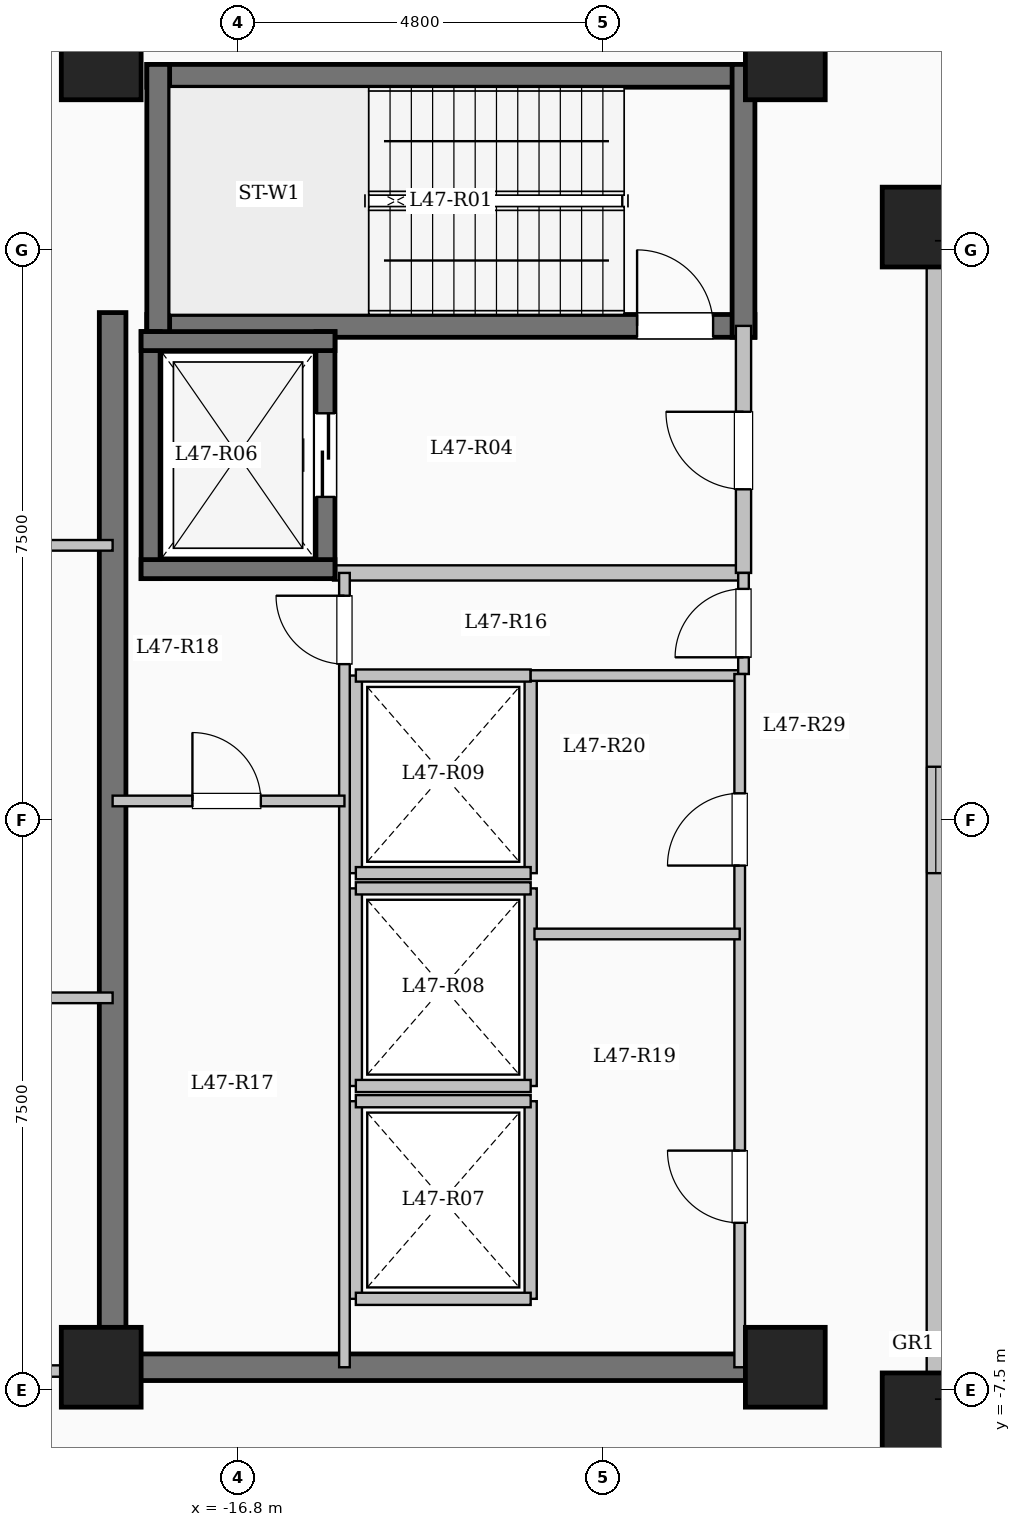
"""IFC4 building model, lengths in metres.
Left out: names, types, materials, properties, quantities, classifications, styles, units other than length and angle.
Written with IfcOpenShell. Run it as: python <this file> out.ifc"""

import sys

from ifc_helpers import new_model, si_unit, direction, frame, frame_2d, origin, origin_2d, place, context, subcontext, project, spatial, rectangle, extrude, element, fill, save


model = new_model("IFC4")
c1 = context("Model", 3, precision=1e-05, world=origin(), true_north=direction((0.0, 1.0)))
c2 = subcontext(c1, "Body", "Model", "MODEL_VIEW")
j1 = project(units=[si_unit("LENGTHUNIT", "METRE"), si_unit("PLANEANGLEUNIT", "RADIAN")], contexts=[c1])
p1 = place(None, origin())
s1 = spatial("IfcSite", under=j1, at=p1, CompositionType="ELEMENT")
p2 = place(p1, origin())
s2 = spatial("IfcBuilding", under=s1, at=p2, CompositionType="ELEMENT")
p3 = place(p2, frame((0.0, 0.0, 172.8)))
s3 = spatial("IfcBuildingStorey", under=s2, at=p3, CompositionType="ELEMENT", Elevation=172.8)
for number, where, z_axis, x_axis in (
    (1, (-7.8, -7.8, 0.0), (0.0, 0.0, 1.0), (1.0, 0.0, 0.0)),
    (2, (-7.8, 7.8, 0.0), (0.0, 0.0, 1.0), (1.0, 0.0, 0.0)),
    (3, (-9.6, -7.2, 0.0), (0.0, 0.0, 1.0), (1.0, 0.0, 0.0)),
    (4, (-9.6, 10.0, 0.0), (0.0, 0.0, 1.0), (1.0, 0.0, 0.0)),
    (5, (-18.6, -7.2, 0.0), (0.0, 0.0, 1.0), (1.0, 0.0, 0.0)),
    (6, (-18.6, 10.0, 0.0), (0.0, 0.0, 1.0), (1.0, 0.0, 0.0)),
):
    element("IfcColumn", number, at=place(p3, frame(where, z_axis=z_axis, x_axis=x_axis)), inside=s3, PredefinedType="COLUMN", context=c2, shape_type="SweptSolid", body=[
        extrude(rectangle(XDim=1.05, YDim=1.05, at=origin_2d()), origin(), (0.0, 0.0, 1.0), 4.5),
    ])
p4 = place(p3, frame((-7.62, 7.62, 0.0), z_axis=(0.0, 0.0, 1.0), x_axis=(0.0, -1.0, 0.0)))
e7 = element("IfcWall", 7, at=p4, inside=s3, PredefinedType="SOLIDWALL", context=c2, shape_type="SweptSolid", body=[
    extrude(rectangle(XDim=15.24, YDim=0.24, at=frame_2d((7.62, 0.0))), origin(), (0.0, 0.0, 1.0), 4.2),
])
p5 = place(p4, frame((6.92, 0.0, 0.95)))
e8 = element("IfcOpeningElement", 8, at=p5, cuts=e7, PredefinedType="OPENING", context=c2, shape_type="SweptSolid", body=[
    extrude(rectangle(XDim=1.4, YDim=1.5, at=frame_2d((0.7, 0.75))), frame((0.0, 0.13, 0.0), z_axis=(0.0, -1.0, 0.0), x_axis=(1.0, 0.0, 0.0)), (0.0, 0.0, 1.0), 0.26),
])
p6 = place(p3, frame((-18.0, 9.79, 0.0), z_axis=(0.0, 0.0, 1.0), x_axis=(1.0, 0.0, 0.0)))
e9 = element("IfcWall", 9, at=p6, inside=s3, PredefinedType="SHEAR", context=c2, shape_type="SweptSolid", body=[
    extrude(rectangle(XDim=8.0, YDim=0.3, at=frame_2d((4.0, 0.0))), origin(), (0.0, 0.0, 1.0), 4.5),
])
p7 = place(p3, frame((-18.0, 6.5, 0.0), z_axis=(0.0, 0.0, 1.0), x_axis=(1.0, 0.0, 0.0)))
e10 = element("IfcWall", 10, at=p7, inside=s3, PredefinedType="SHEAR", context=c2, shape_type="SweptSolid", body=[
    extrude(rectangle(XDim=8.0, YDim=0.3, at=frame_2d((4.0, 0.0))), origin(), (0.0, 0.0, 1.0), 4.5),
])
p8 = place(p7, frame((6.45, 0.0, 0.0)))
e11 = element("IfcOpeningElement", 11, at=p8, cuts=e10, PredefinedType="OPENING", context=c2, shape_type="SweptSolid", body=[
    extrude(rectangle(XDim=1.0, YDim=2.15, at=frame_2d((0.5, 1.075))), frame((0.0, 0.16, 0.0), z_axis=(0.0, -1.0, 0.0), x_axis=(1.0, 0.0, 0.0)), (0.0, 0.0, 1.0), 0.32),
])
for number, where, z_axis, x_axis in (
    (12, (-17.85, 6.35, 0.0), (0.0, 0.0, 1.0), (0.0, 1.0, 0.0)),
    (13, (-10.15, 6.35, 0.0), (0.0, 0.0, 1.0), (0.0, 1.0, 0.0)),
):
    element("IfcWall", number, at=place(p3, frame(where, z_axis=z_axis, x_axis=x_axis)), inside=s3, PredefinedType="SHEAR", context=c2, shape_type="SweptSolid", body=[
        extrude(rectangle(XDim=3.59, YDim=0.3, at=frame_2d((1.795, 0.0))), origin(), (0.0, 0.0, 1.0), 4.5),
    ])
p9 = place(p3, frame((-15.55, 3.25, 0.0), z_axis=(0.0, 0.0, 1.0), x_axis=(1.0, 0.0, 0.0)))
e14 = element("IfcWall", 14, at=p9, inside=s3, PredefinedType="SOLIDWALL", context=c2, shape_type="SweptSolid", body=[
    extrude(rectangle(XDim=5.4, YDim=0.2, at=frame_2d((2.7, 0.0))), origin(), (0.0, 0.0, 1.0), 4.2),
])
p10 = place(p3, frame((-10.15, 3.25, 0.0), z_axis=(0.0, 0.0, 1.0), x_axis=(0.0, 1.0, 0.0)))
e15 = element("IfcWall", 15, at=p10, inside=s3, PredefinedType="SOLIDWALL", context=c2, shape_type="SweptSolid", body=[
    extrude(rectangle(XDim=3.25, YDim=0.2, at=frame_2d((1.625, 0.0))), origin(), (0.0, 0.0, 1.0), 4.2),
])
p11 = place(p10, frame((1.1, 0.0, 0.0)))
e16 = element("IfcOpeningElement", 16, at=p11, cuts=e15, PredefinedType="OPENING", context=c2, shape_type="SweptSolid", body=[
    extrude(rectangle(XDim=1.02, YDim=2.15, at=frame_2d((0.51, 1.075))), frame((0.0, 0.11, 0.0), z_axis=(0.0, -1.0, 0.0), x_axis=(1.0, 0.0, 0.0)), (0.0, 0.0, 1.0), 0.22),
])
p12 = place(p3, frame((-17.95, 3.175, 0.0), z_axis=(0.0, 0.0, 1.0), x_axis=(0.0, 1.0, 0.0)))
e17 = element("IfcWall", 17, at=p12, inside=s3, PredefinedType="SHEAR", context=c2, shape_type="SweptSolid", body=[
    extrude(rectangle(XDim=3.25, YDim=0.25, at=frame_2d((1.625, 0.0))), origin(), (0.0, 0.0, 1.0), 4.5),
])
p13 = place(p3, frame((-15.65, 3.175, 0.0), z_axis=(0.0, 0.0, 1.0), x_axis=(0.0, 1.0, 0.0)))
e18 = element("IfcWall", 18, at=p13, inside=s3, PredefinedType="SHEAR", context=c2, shape_type="SweptSolid", body=[
    extrude(rectangle(XDim=3.25, YDim=0.25, at=frame_2d((1.625, 0.0))), origin(), (0.0, 0.0, 1.0), 4.5),
])
p14 = place(p13, frame((1.075, 0.0, 0.0)))
e19 = element("IfcOpeningElement", 19, at=p14, cuts=e18, PredefinedType="OPENING", context=c2, shape_type="SweptSolid", body=[
    extrude(rectangle(XDim=1.1, YDim=2.15, at=frame_2d((0.55, 1.075))), frame((0.0, 0.135, 0.0), z_axis=(0.0, -1.0, 0.0), x_axis=(1.0, 0.0, 0.0)), (0.0, 0.0, 1.0), 0.27),
])
for number, where, z_axis, x_axis in (
    (20, (-18.075, 3.3, 0.0), (0.0, 0.0, 1.0), (1.0, 0.0, 0.0)),
    (21, (-18.075, 6.3, 0.0), (0.0, 0.0, 1.0), (1.0, 0.0, 0.0)),
):
    element("IfcWall", number, at=place(p3, frame(where, z_axis=z_axis, x_axis=x_axis)), inside=s3, PredefinedType="SHEAR", context=c2, shape_type="SweptSolid", body=[
        extrude(rectangle(XDim=2.55, YDim=0.25, at=frame_2d((1.275, 0.0))), origin(), (0.0, 0.0, 1.0), 4.5),
    ])
for number, where, z_axis, x_axis in (
    (22, (-15.25, -6.3, 0.0), (0.0, 0.0, 1.0), (0.0, 1.0, 0.0)),
    (23, (-12.95, -6.3, 0.0), (0.0, 0.0, 1.0), (0.0, 1.0, 0.0)),
):
    element("IfcWall", number, at=place(p3, frame(where, z_axis=z_axis, x_axis=x_axis)), inside=s3, PredefinedType="SOLIDWALL", context=c2, shape_type="SweptSolid", body=[
        extrude(rectangle(XDim=2.6, YDim=0.16, at=frame_2d((1.3, 0.0))), origin(), (0.0, 0.0, 1.0), 4.2),
    ])
for number, where, z_axis, x_axis in (
    (24, (-15.25, -6.3, 0.0), (0.0, 0.0, 1.0), (1.0, 0.0, 0.0)),
    (25, (-15.25, -3.7, 0.0), (0.0, 0.0, 1.0), (1.0, 0.0, 0.0)),
):
    element("IfcWall", number, at=place(p3, frame(where, z_axis=z_axis, x_axis=x_axis)), inside=s3, PredefinedType="SOLIDWALL", context=c2, shape_type="SweptSolid", body=[
        extrude(rectangle(XDim=2.3, YDim=0.16, at=frame_2d((1.15, 0.0))), origin(), (0.0, 0.0, 1.0), 4.2),
    ])
for number, where, z_axis, x_axis in (
    (26, (-15.25, -3.5, 0.0), (0.0, 0.0, 1.0), (0.0, 1.0, 0.0)),
    (27, (-12.95, -3.5, 0.0), (0.0, 0.0, 1.0), (0.0, 1.0, 0.0)),
):
    element("IfcWall", number, at=place(p3, frame(where, z_axis=z_axis, x_axis=x_axis)), inside=s3, PredefinedType="SOLIDWALL", context=c2, shape_type="SweptSolid", body=[
        extrude(rectangle(XDim=2.6, YDim=0.16, at=frame_2d((1.3, 0.0))), origin(), (0.0, 0.0, 1.0), 4.2),
    ])
for number, where, z_axis, x_axis in (
    (28, (-15.25, -3.5, 0.0), (0.0, 0.0, 1.0), (1.0, 0.0, 0.0)),
    (29, (-15.25, -0.9, 0.0), (0.0, 0.0, 1.0), (1.0, 0.0, 0.0)),
):
    element("IfcWall", number, at=place(p3, frame(where, z_axis=z_axis, x_axis=x_axis)), inside=s3, PredefinedType="SOLIDWALL", context=c2, shape_type="SweptSolid", body=[
        extrude(rectangle(XDim=2.3, YDim=0.16, at=frame_2d((1.15, 0.0))), origin(), (0.0, 0.0, 1.0), 4.2),
    ])
for number, where, z_axis, x_axis in (
    (30, (-15.25, -0.7, 0.0), (0.0, 0.0, 1.0), (0.0, 1.0, 0.0)),
    (31, (-12.95, -0.7, 0.0), (0.0, 0.0, 1.0), (0.0, 1.0, 0.0)),
):
    element("IfcWall", number, at=place(p3, frame(where, z_axis=z_axis, x_axis=x_axis)), inside=s3, PredefinedType="SOLIDWALL", context=c2, shape_type="SweptSolid", body=[
        extrude(rectangle(XDim=2.6, YDim=0.16, at=frame_2d((1.3, 0.0))), origin(), (0.0, 0.0, 1.0), 4.2),
    ])
for number, where, z_axis, x_axis in (
    (32, (-15.25, -0.7, 0.0), (0.0, 0.0, 1.0), (1.0, 0.0, 0.0)),
    (33, (-15.25, 1.9, 0.0), (0.0, 0.0, 1.0), (1.0, 0.0, 0.0)),
):
    element("IfcWall", number, at=place(p3, frame(where, z_axis=z_axis, x_axis=x_axis)), inside=s3, PredefinedType="SOLIDWALL", context=c2, shape_type="SweptSolid", body=[
        extrude(rectangle(XDim=2.3, YDim=0.16, at=frame_2d((1.15, 0.0))), origin(), (0.0, 0.0, 1.0), 4.2),
    ])
p15 = place(p3, frame((-18.45, -7.375, 0.0), z_axis=(0.0, 0.0, 1.0), x_axis=(0.0, 1.0, 0.0)))
e34 = element("IfcWall", 34, at=p15, inside=s3, PredefinedType="SHEAR", context=c2, shape_type="SweptSolid", body=[
    extrude(rectangle(XDim=14.05, YDim=0.35, at=frame_2d((7.025, 0.0))), origin(), (0.0, 0.0, 1.0), 4.5),
])
p16 = place(p3, frame((-18.625, -7.2, 0.0), z_axis=(0.0, 0.0, 1.0), x_axis=(1.0, 0.0, 0.0)))
e35 = element("IfcWall", 35, at=p16, inside=s3, PredefinedType="SHEAR", context=c2, shape_type="SweptSolid", body=[
    extrude(rectangle(XDim=8.55, YDim=0.35, at=frame_2d((4.275, 0.0))), origin(), (0.0, 0.0, 1.0), 4.5),
])
p17 = place(p3, frame((-12.95, 1.9, 0.0), z_axis=(0.0, 0.0, 1.0), x_axis=(1.0, 0.0, 0.0)))
e36 = element("IfcWall", 36, at=p17, inside=s3, PredefinedType="PARTITIONING", context=c2, shape_type="SweptSolid", body=[
    extrude(rectangle(XDim=2.8, YDim=0.14, at=frame_2d((1.4, 0.0))), origin(), (0.0, 0.0, 1.0), 4.2),
])
p18 = place(p3, frame((-10.15, 1.92, 0.0), z_axis=(0.0, 0.0, 1.0), x_axis=(0.0, 1.0, 0.0)))
e37 = element("IfcWall", 37, at=p18, inside=s3, PredefinedType="PARTITIONING", context=c2, shape_type="SweptSolid", body=[
    extrude(rectangle(XDim=1.33, YDim=0.14, at=frame_2d((0.665, 0.0))), origin(), (0.0, 0.0, 1.0), 4.2),
])
p19 = place(p18, frame((0.22, 0.0, 0.0)))
e38 = element("IfcOpeningElement", 38, at=p19, cuts=e37, PredefinedType="OPENING", context=c2, shape_type="SweptSolid", body=[
    extrude(rectangle(XDim=0.9, YDim=2.08, at=frame_2d((0.45, 1.04))), frame((0.0, 0.08, 0.0), z_axis=(0.0, -1.0, 0.0), x_axis=(1.0, 0.0, 0.0)), (0.0, 0.0, 1.0), 0.16),
])
p20 = place(p3, frame((-15.4, -7.2, 0.0), z_axis=(0.0, 0.0, 1.0), x_axis=(0.0, 1.0, 0.0)))
e39 = element("IfcWall", 39, at=p20, inside=s3, PredefinedType="PARTITIONING", context=c2, shape_type="SweptSolid", body=[
    extrude(rectangle(XDim=10.45, YDim=0.14, at=frame_2d((5.225, 0.0))), origin(), (0.0, 0.0, 1.0), 4.2),
])
p21 = place(p20, frame((9.25, 0.0, 0.0)))
e40 = element("IfcOpeningElement", 40, at=p21, cuts=e39, PredefinedType="OPENING", context=c2, shape_type="SweptSolid", body=[
    extrude(rectangle(XDim=0.9, YDim=2.08, at=frame_2d((0.45, 1.04))), frame((0.0, 0.08, 0.0), z_axis=(0.0, -1.0, 0.0), x_axis=(1.0, 0.0, 0.0)), (0.0, 0.0, 1.0), 0.16),
])
p22 = place(p3, frame((-18.45, 0.25, 0.0), z_axis=(0.0, 0.0, 1.0), x_axis=(1.0, 0.0, 0.0)))
e41 = element("IfcWall", 41, at=p22, inside=s3, PredefinedType="PARTITIONING", context=c2, shape_type="SweptSolid", body=[
    extrude(rectangle(XDim=3.05, YDim=0.14, at=frame_2d((1.525, 0.0))), origin(), (0.0, 0.0, 1.0), 4.2),
])
p23 = place(p22, frame((1.05, 0.0, 0.0)))
e42 = element("IfcOpeningElement", 42, at=p23, cuts=e41, PredefinedType="OPENING", context=c2, shape_type="SweptSolid", body=[
    extrude(rectangle(XDim=0.9, YDim=2.08, at=frame_2d((0.45, 1.04))), frame((0.0, 0.08, 0.0), z_axis=(0.0, -1.0, 0.0), x_axis=(1.0, 0.0, 0.0)), (0.0, 0.0, 1.0), 0.16),
])
p24 = place(p3, frame((-10.2, -7.2, 0.0), z_axis=(0.0, 0.0, 1.0), x_axis=(0.0, 1.0, 0.0)))
e43 = element("IfcWall", 43, at=p24, inside=s3, PredefinedType="PARTITIONING", context=c2, shape_type="SweptSolid", body=[
    extrude(rectangle(XDim=9.12, YDim=0.14, at=frame_2d((4.56, 0.0))), origin(), (0.0, 0.0, 1.0), 4.2),
])
p25 = place(p24, frame((1.9, 0.0, 0.0)))
e44 = element("IfcOpeningElement", 44, at=p25, cuts=e43, PredefinedType="OPENING", context=c2, shape_type="SweptSolid", body=[
    extrude(rectangle(XDim=0.95, YDim=2.12, at=frame_2d((0.475, 1.06))), frame((0.0, 0.08, 0.0), z_axis=(0.0, -1.0, 0.0), x_axis=(1.0, 0.0, 0.0)), (0.0, 0.0, 1.0), 0.16),
])
p26 = place(p24, frame((6.6, 0.0, 0.0)))
e45 = element("IfcOpeningElement", 45, at=p26, cuts=e43, PredefinedType="OPENING", context=c2, shape_type="SweptSolid", body=[
    extrude(rectangle(XDim=0.95, YDim=2.12, at=frame_2d((0.475, 1.06))), frame((0.0, 0.08, 0.0), z_axis=(0.0, -1.0, 0.0), x_axis=(1.0, 0.0, 0.0)), (0.0, 0.0, 1.0), 0.16),
])
p27 = place(p3, frame((-12.9, -1.5, 0.0), z_axis=(0.0, 0.0, 1.0), x_axis=(1.0, 0.0, 0.0)))
e46 = element("IfcWall", 46, at=p27, inside=s3, PredefinedType="PARTITIONING", context=c2, shape_type="SweptSolid", body=[
    extrude(rectangle(XDim=2.7, YDim=0.14, at=frame_2d((1.35, 0.0))), origin(), (0.0, 0.0, 1.0), 4.2),
])
p28 = place(p3, frame((-25.08, -7.25, 0.0), z_axis=(0.0, 0.0, 1.0), x_axis=(1.0, 0.0, 0.0)))
e47 = element("IfcWall", 47, at=p28, inside=s3, PredefinedType="PARTITIONING", context=c2, shape_type="SweptSolid", body=[
    extrude(rectangle(XDim=6.63, YDim=0.15, at=frame_2d((3.315, 0.0))), origin(), (0.0, 0.0, 1.0), 4.2),
])
p29 = place(p28, frame((3.58, 0.0, 0.0)))
e48 = element("IfcOpeningElement", 48, at=p29, cuts=e47, PredefinedType="OPENING", context=c2, shape_type="SweptSolid", body=[
    extrude(rectangle(XDim=1.08, YDim=2.15, at=frame_2d((0.54, 1.075))), frame((0.0, 0.085, 0.0), z_axis=(0.0, -1.0, 0.0), x_axis=(1.0, 0.0, 0.0)), (0.0, 0.0, 1.0), 0.17),
])
p30 = place(p3, frame((-25.08, -2.34, 0.0), z_axis=(0.0, 0.0, 1.0), x_axis=(1.0, 0.0, 0.0)))
e49 = element("IfcWall", 49, at=p30, inside=s3, PredefinedType="PARTITIONING", context=c2, shape_type="SweptSolid", body=[
    extrude(rectangle(XDim=6.63, YDim=0.14, at=frame_2d((3.315, 0.0))), origin(), (0.0, 0.0, 1.0), 4.2),
])
p31 = place(p30, frame((4.48, 0.0, 0.0)))
e50 = element("IfcOpeningElement", 50, at=p31, cuts=e49, PredefinedType="OPENING", context=c2, shape_type="SweptSolid", body=[
    extrude(rectangle(XDim=1.08, YDim=2.15, at=frame_2d((0.54, 1.075))), frame((0.0, 0.08, 0.0), z_axis=(0.0, -1.0, 0.0), x_axis=(1.0, 0.0, 0.0)), (0.0, 0.0, 1.0), 0.16),
])
p32 = place(p3, frame((-25.08, 3.613, 0.0), z_axis=(0.0, 0.0, 1.0), x_axis=(1.0, 0.0, 0.0)))
e51 = element("IfcWall", 51, at=p32, inside=s3, PredefinedType="PARTITIONING", context=c2, shape_type="SweptSolid", body=[
    extrude(rectangle(XDim=6.63, YDim=0.14, at=frame_2d((3.315, 0.0))), origin(), (0.0, 0.0, 1.0), 4.2),
])
p33 = place(p32, frame((4.48, 0.0, 0.0)))
e52 = element("IfcOpeningElement", 52, at=p33, cuts=e51, PredefinedType="OPENING", context=c2, shape_type="SweptSolid", body=[
    extrude(rectangle(XDim=1.08, YDim=2.15, at=frame_2d((0.54, 1.075))), frame((0.0, 0.08, 0.0), z_axis=(0.0, -1.0, 0.0), x_axis=(1.0, 0.0, 0.0)), (0.0, 0.0, 1.0), 0.16),
])
p34 = place(p5, origin())
e53 = element("IfcWindow", 53, at=p34, inside=s3, PartitioningType="SINGLE_PANEL", PredefinedType="WINDOW", context=c2, shape_type="SweptSolid", body=[
    extrude(rectangle(XDim=1.4, YDim=1.5, at=frame_2d((0.7, 0.75))), frame((0.0, 0.03, 0.0), z_axis=(0.0, -1.0, 0.0), x_axis=(1.0, 0.0, 0.0)), (0.0, 0.0, 1.0), 0.06),
])
fill(e8, e53)
p35 = place(p8, origin())
e54 = element("IfcDoor", 54, at=p35, inside=s3, OperationType="SINGLE_SWING_LEFT", PredefinedType="DOOR", context=c2, shape_type="SweptSolid", body=[
    extrude(rectangle(XDim=1.0, YDim=2.15, at=frame_2d((0.5, 1.075))), frame((0.0, 0.025, 0.0), z_axis=(0.0, -1.0, 0.0), x_axis=(1.0, 0.0, 0.0)), (0.0, 0.0, 1.0), 0.05),
])
fill(e11, e54)
p36 = place(p11, origin())
e55 = element("IfcDoor", 55, at=p36, inside=s3, OperationType="SINGLE_SWING_RIGHT", PredefinedType="DOOR", context=c2, shape_type="SweptSolid", body=[
    extrude(rectangle(XDim=1.02, YDim=2.15, at=frame_2d((0.51, 1.075))), frame((0.0, 0.025, 0.0), z_axis=(0.0, -1.0, 0.0), x_axis=(1.0, 0.0, 0.0)), (0.0, 0.0, 1.0), 0.05),
])
fill(e16, e55)
p37 = place(p14, origin())
e56 = element("IfcDoor", 56, at=p37, inside=s3, OperationType="SLIDING_TO_LEFT", PredefinedType="DOOR", context=c2, shape_type="SweptSolid", body=[
    extrude(rectangle(XDim=1.1, YDim=2.15, at=frame_2d((0.55, 1.075))), frame((0.0, 0.025, 0.0), z_axis=(0.0, -1.0, 0.0), x_axis=(1.0, 0.0, 0.0)), (0.0, 0.0, 1.0), 0.05),
])
fill(e19, e56)
p38 = place(p19, origin())
e57 = element("IfcDoor", 57, at=p38, inside=s3, OperationType="SINGLE_SWING_LEFT", PredefinedType="DOOR", context=c2, shape_type="SweptSolid", body=[
    extrude(rectangle(XDim=0.9, YDim=2.08, at=frame_2d((0.45, 1.04))), frame((0.0, 0.025, 0.0), z_axis=(0.0, -1.0, 0.0), x_axis=(1.0, 0.0, 0.0)), (0.0, 0.0, 1.0), 0.05),
])
fill(e38, e57)
p39 = place(p21, origin())
e58 = element("IfcDoor", 58, at=p39, inside=s3, OperationType="SINGLE_SWING_RIGHT", PredefinedType="DOOR", context=c2, shape_type="SweptSolid", body=[
    extrude(rectangle(XDim=0.9, YDim=2.08, at=frame_2d((0.45, 1.04))), frame((0.0, 0.025, 0.0), z_axis=(0.0, -1.0, 0.0), x_axis=(1.0, 0.0, 0.0)), (0.0, 0.0, 1.0), 0.05),
])
fill(e40, e58)
p40 = place(p23, origin())
e59 = element("IfcDoor", 59, at=p40, inside=s3, OperationType="SINGLE_SWING_LEFT", PredefinedType="DOOR", context=c2, shape_type="SweptSolid", body=[
    extrude(rectangle(XDim=0.9, YDim=2.08, at=frame_2d((0.45, 1.04))), frame((0.0, 0.025, 0.0), z_axis=(0.0, -1.0, 0.0), x_axis=(1.0, 0.0, 0.0)), (0.0, 0.0, 1.0), 0.05),
])
fill(e42, e59)
p41 = place(p25, origin())
e60 = element("IfcDoor", 60, at=p41, inside=s3, OperationType="SINGLE_SWING_RIGHT", PredefinedType="DOOR", context=c2, shape_type="SweptSolid", body=[
    extrude(rectangle(XDim=0.95, YDim=2.12, at=frame_2d((0.475, 1.06))), frame((0.0, 0.025, 0.0), z_axis=(0.0, -1.0, 0.0), x_axis=(1.0, 0.0, 0.0)), (0.0, 0.0, 1.0), 0.05),
])
fill(e44, e60)
p42 = place(p26, origin())
e61 = element("IfcDoor", 61, at=p42, inside=s3, OperationType="SINGLE_SWING_LEFT", PredefinedType="DOOR", context=c2, shape_type="SweptSolid", body=[
    extrude(rectangle(XDim=0.95, YDim=2.12, at=frame_2d((0.475, 1.06))), frame((0.0, 0.025, 0.0), z_axis=(0.0, -1.0, 0.0), x_axis=(1.0, 0.0, 0.0)), (0.0, 0.0, 1.0), 0.05),
])
fill(e45, e61)
save(model, sys.argv[1])
